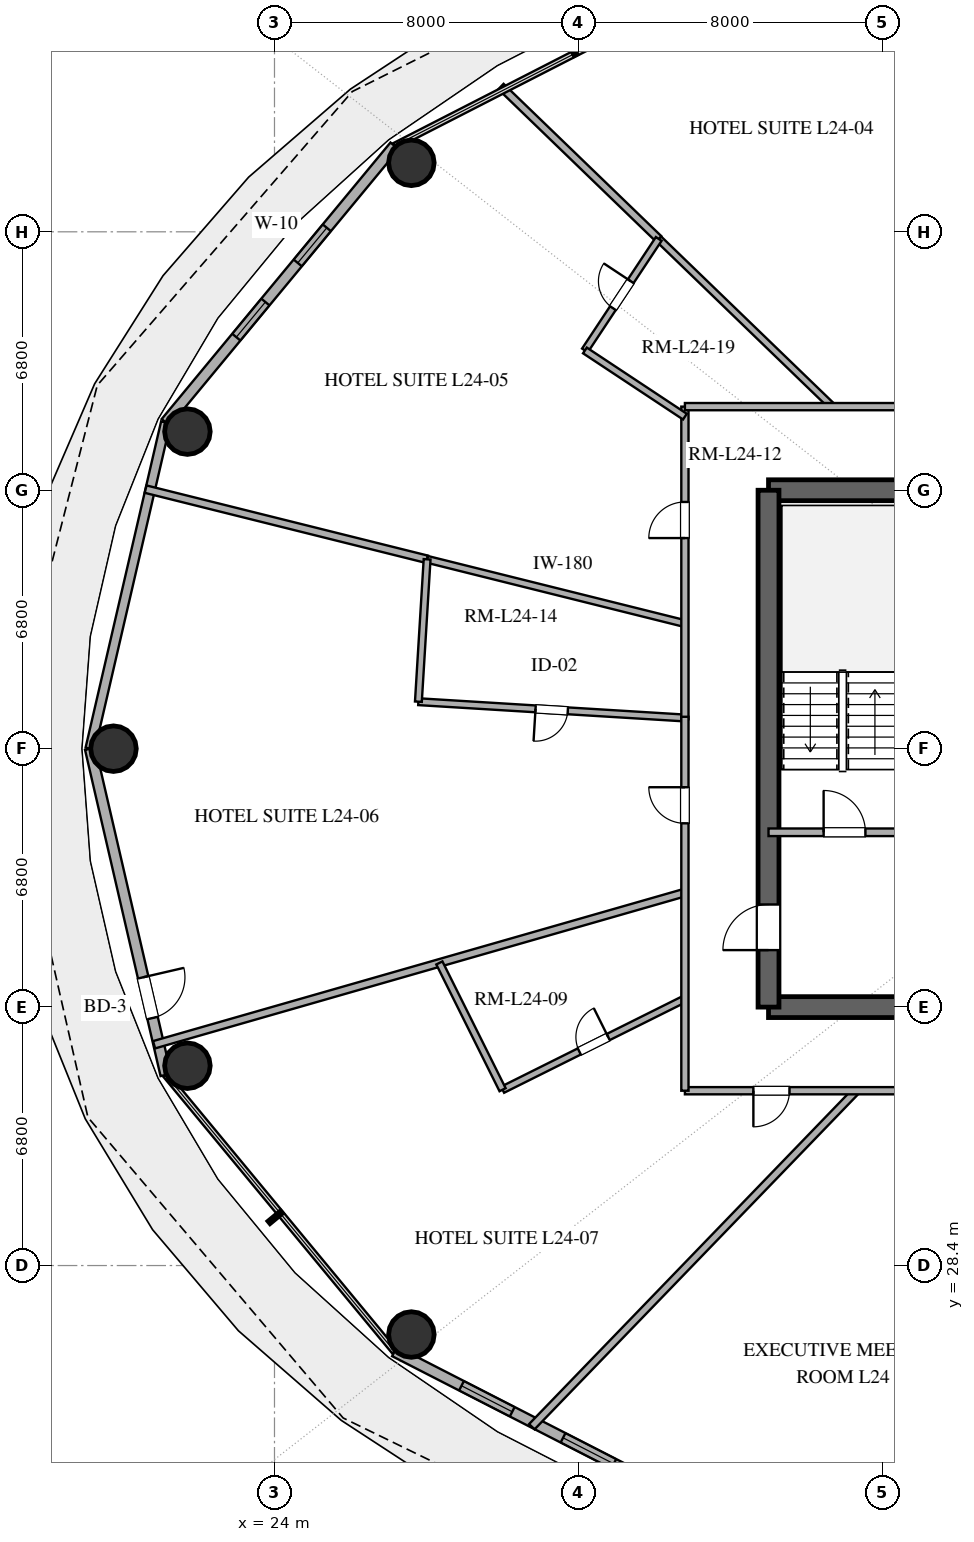
"""IFC4 building model, lengths in metres.
Left out: names, types, materials, properties, quantities, classifications, styles, units other than length and angle.
Written with IfcOpenShell. Run it as: python <this file> out.ifc"""

import sys

from ifc_helpers import new_model, si_unit, direction, frame, frame_2d, origin, origin_2d, place, context, subcontext, project, spatial, rectangle, hollow_circle, extrude, element, fill, save


model = new_model("IFC4")
c1 = context("Model", 3, precision=1e-05, world=origin(), true_north=direction((0.0, 1.0)))
c2 = subcontext(c1, "Body", "Model", "MODEL_VIEW")
j1 = project(units=[si_unit("LENGTHUNIT", "METRE"), si_unit("PLANEANGLEUNIT", "RADIAN")], contexts=[c1])
p1 = place(None, origin())
s1 = spatial("IfcSite", under=j1, at=p1, CompositionType="ELEMENT")
p2 = place(p1, origin())
s2 = spatial("IfcBuilding", under=s1, at=p2, CompositionType="ELEMENT")
p3 = place(p2, frame((0.0, 0.0, 98.4)))
s3 = spatial("IfcBuildingStorey", under=s2, at=p3, CompositionType="ELEMENT", Elevation=98.4)
for number, where, z_axis, x_axis in (
    (1, (37.0, 35.2, 0.0), (0.0, 0.0, 1.0), (1.0, 0.0, 0.0)),
    (2, (37.0, 48.8, 0.0), (0.0, 0.0, 1.0), (1.0, 0.0, 0.0)),
):
    element("IfcWall", number, at=place(p3, frame(where, z_axis=z_axis, x_axis=x_axis)), inside=s3, PredefinedType="SHEAR", context=c2, shape_type="SweptSolid", body=[
        extrude(rectangle(XDim=4.0, YDim=0.55, at=frame_2d((2.0, 0.0))), origin(), (0.0, 0.0, 1.0), 3.38),
    ])
p4 = place(p3, frame((37.0, 35.2, 0.0), z_axis=(0.0, 0.0, 1.0), x_axis=(0.0, 1.0, 0.0)))
e3 = element("IfcWall", 3, at=p4, inside=s3, PredefinedType="SHEAR", context=c2, shape_type="SweptSolid", body=[
    extrude(rectangle(XDim=13.6, YDim=0.55, at=frame_2d((6.8, 0.0))), origin(), (0.0, 0.0, 1.0), 3.38),
])
p5 = place(p4, frame((1.5, 0.0, 0.0)))
e4 = element("IfcOpeningElement", 4, at=p5, cuts=e3, PredefinedType="OPENING", context=c2, shape_type="SweptSolid", body=[
    extrude(rectangle(XDim=1.2, YDim=2.15, at=frame_2d((0.6, 1.075))), frame((0.0, 0.285, 0.0), z_axis=(0.0, -1.0, 0.0), x_axis=(1.0, 0.0, 0.0)), (0.0, 0.0, 1.0), 0.57),
])
for number, where, z_axis, x_axis in (
    (5, (27.602, 57.415, 0.0), (0.0, 0.0, 1.0), (1.0, 0.0, 0.0)),
    (6, (21.709, 50.343, 0.0), (0.0, 0.0, 1.0), (1.0, 0.0, 0.0)),
    (7, (19.763, 42.0, 0.0), (0.0, 0.0, 1.0), (1.0, 0.0, 0.0)),
    (8, (21.709, 33.657, 0.0), (0.0, 0.0, 1.0), (1.0, 0.0, 0.0)),
    (9, (27.602, 26.585, 0.0), (0.0, 0.0, 1.0), (1.0, 0.0, 0.0)),
):
    element("IfcColumn", number, at=place(p3, frame(where, z_axis=z_axis, x_axis=x_axis)), inside=s3, PredefinedType="COLUMN", context=c2, shape_type="SweptSolid", body=[
        extrude(hollow_circle(Radius=0.6, WallThickness=0.032, at=origin_2d()), origin(), (0.0, 0.0, 1.0), 3.38),
    ])
p6 = place(p3, frame((27.16, 57.86, 0.0), z_axis=(0.0, 0.0, 1.0), x_axis=(-0.637505817448, -0.770445541696, 0.0)))
e10 = element("IfcWall", 10, at=p6, inside=s3, PredefinedType="SOLIDWALL", context=c2, shape_type="SweptSolid", body=[
    extrude(rectangle(XDim=9.445, YDim=0.28, at=frame_2d((4.723, 0.0))), origin(), (0.0, 0.0, 1.0), 3.38),
])
p7 = place(p6, frame((2.797, 0.0, 0.85)))
e11 = element("IfcOpeningElement", 11, at=p7, cuts=e10, PredefinedType="OPENING", context=c2, shape_type="SweptSolid", body=[
    extrude(rectangle(XDim=1.2, YDim=1.6, at=frame_2d((0.6, 0.8))), frame((0.0, 0.15, 0.0), z_axis=(0.0, -1.0, 0.0), x_axis=(1.0, 0.0, 0.0)), (0.0, 0.0, 1.0), 0.3),
])
p8 = place(p6, frame((5.332, 0.0, 0.85)))
e12 = element("IfcOpeningElement", 12, at=p8, cuts=e10, PredefinedType="OPENING", context=c2, shape_type="SweptSolid", body=[
    extrude(rectangle(XDim=1.2, YDim=1.6, at=frame_2d((0.6, 0.8))), frame((0.0, 0.15, 0.0), z_axis=(0.0, -1.0, 0.0), x_axis=(1.0, 0.0, 0.0)), (0.0, 0.0, 1.0), 0.3),
])
p9 = place(p3, frame((21.139, 50.583, 0.0), z_axis=(0.0, 0.0, 1.0), x_axis=(-0.22558597182, -0.974223264616, 0.0)))
e13 = element("IfcWall", 13, at=p9, inside=s3, PredefinedType="SOLIDWALL", context=c2, shape_type="SweptSolid", body=[
    extrude(rectangle(XDim=8.811, YDim=0.25, at=frame_2d((4.405, 0.0))), origin(), (0.0, 0.0, 1.0), 3.38),
])
p10 = place(p3, frame((19.151, 42.0, 0.0), z_axis=(0.0, 0.0, 1.0), x_axis=(0.22558597182, -0.974223264616, 0.0)))
e14 = element("IfcWall", 14, at=p10, inside=s3, PredefinedType="SOLIDWALL", context=c2, shape_type="SweptSolid", body=[
    extrude(rectangle(XDim=8.811, YDim=0.28, at=frame_2d((4.405, 0.0))), origin(), (0.0, 0.0, 1.0), 3.38),
])
p11 = place(p10, frame((6.175, 0.0, 0.0)))
e15 = element("IfcOpeningElement", 15, at=p11, cuts=e14, PredefinedType="OPENING", context=c2, shape_type="SweptSolid", body=[
    extrude(rectangle(XDim=1.1, YDim=2.25, at=frame_2d((0.55, 1.125))), frame((0.0, 0.15, 0.0), z_axis=(0.0, -1.0, 0.0), x_axis=(1.0, 0.0, 0.0)), (0.0, 0.0, 1.0), 0.3),
])
p12 = place(p3, frame((27.16, 26.14, 0.0), z_axis=(0.0, 0.0, 1.0), x_axis=(0.889959505023, -0.45603955905, 0.0)))
e16 = element("IfcWall", 16, at=p12, inside=s3, PredefinedType="SOLIDWALL", context=c2, shape_type="SweptSolid", body=[
    extrude(rectangle(XDim=10.662, YDim=0.28, at=frame_2d((5.331, 0.0))), origin(), (0.0, 0.0, 1.0), 3.38),
])
p13 = place(p12, frame((1.979, 0.0, 0.85)))
e17 = element("IfcOpeningElement", 17, at=p13, cuts=e16, PredefinedType="OPENING", context=c2, shape_type="SweptSolid", body=[
    extrude(rectangle(XDim=1.5, YDim=2.0, at=frame_2d((0.75, 1.0))), frame((0.0, 0.15, 0.0), z_axis=(0.0, -1.0, 0.0), x_axis=(1.0, 0.0, 0.0)), (0.0, 0.0, 1.0), 0.3),
])
p14 = place(p12, frame((4.982, 0.0, 0.85)))
e18 = element("IfcOpeningElement", 18, at=p14, cuts=e16, PredefinedType="OPENING", context=c2, shape_type="SweptSolid", body=[
    extrude(rectangle(XDim=1.5, YDim=1.8, at=frame_2d((0.75, 0.9))), frame((0.0, 0.15, 0.0), z_axis=(0.0, -1.0, 0.0), x_axis=(1.0, 0.0, 0.0)), (0.0, 0.0, 1.0), 0.3),
])
p15 = place(p12, frame((7.096, 0.0, 0.85)))
e19 = element("IfcOpeningElement", 19, at=p15, cuts=e16, PredefinedType="OPENING", context=c2, shape_type="SweptSolid", body=[
    extrude(rectangle(XDim=1.5, YDim=1.8, at=frame_2d((0.75, 0.9))), frame((0.0, 0.15, 0.0), z_axis=(0.0, -1.0, 0.0), x_axis=(1.0, 0.0, 0.0)), (0.0, 0.0, 1.0), 0.3),
])
p16 = place(p3, frame((37.0, 39.8, 0.0), z_axis=(0.0, 0.0, 1.0), x_axis=(1.0, 0.0, 0.0)))
e20 = element("IfcWall", 20, at=p16, inside=s3, PredefinedType="SOLIDWALL", context=c2, shape_type="SweptSolid", body=[
    extrude(rectangle(XDim=4.0, YDim=0.2, at=frame_2d((2.0, 0.0))), origin(), (0.0, 0.0, 1.0), 2.74),
])
p17 = place(p16, frame((1.45, 0.0, 0.0)))
e21 = element("IfcOpeningElement", 21, at=p17, cuts=e20, PredefinedType="OPENING", context=c2, shape_type="SweptSolid", body=[
    extrude(rectangle(XDim=1.1, YDim=2.15, at=frame_2d((0.55, 1.075))), frame((0.0, 0.11, 0.0), z_axis=(0.0, -1.0, 0.0), x_axis=(1.0, 0.0, 0.0)), (0.0, 0.0, 1.0), 0.22),
])
p18 = place(p3, frame((30.772, 24.16, 0.0), z_axis=(0.0, 0.0, 1.0), x_axis=(0.694672506389, 0.719326149161, 0.0)))
e22 = element("IfcWall", 22, at=p18, inside=s3, PredefinedType="PARTITIONING", context=c2, shape_type="SweptSolid", body=[
    extrude(rectangle(XDim=12.289, YDim=0.2, at=frame_2d((6.145, 0.0))), origin(), (0.0, 0.0, 1.0), 2.74),
])
p19 = place(p3, frame((34.8, 38.215, 0.0), z_axis=(0.0, 0.0, 1.0), x_axis=(-0.961261030421, -0.275639676741, 0.0)))
e23 = element("IfcWall", 23, at=p19, inside=s3, PredefinedType="PARTITIONING", context=c2, shape_type="SweptSolid", body=[
    extrude(rectangle(XDim=14.531, YDim=0.2, at=frame_2d((7.266, 0.0))), origin(), (0.0, 0.0, 1.0), 2.74),
])
p20 = place(p3, frame((20.609, 48.829, 0.0), z_axis=(0.0, 0.0, 1.0), x_axis=(0.970302209845, -0.241895889938, 0.0)))
e24 = element("IfcWall", 24, at=p20, inside=s3, PredefinedType="PARTITIONING", context=c2, shape_type="SweptSolid", body=[
    extrude(rectangle(XDim=7.633, YDim=0.2, at=frame_2d((3.817, 0.0))), origin(), (0.0, 0.0, 1.0), 2.74),
])
p21 = place(p3, frame((34.8, 42.807, 0.0), z_axis=(0.0, 0.0, 1.0), x_axis=(-0.998134708281, 0.061050013314, 0.0)))
e25 = element("IfcWall", 25, at=p21, inside=s3, PredefinedType="PLUMBINGWALL", context=c2, shape_type="SweptSolid", body=[
    extrude(rectangle(XDim=7.026, YDim=0.18, at=frame_2d((3.513, 0.0))), origin(), (0.0, 0.0, 1.0), 2.74),
])
p22 = place(p21, frame((3.088, 0.0, 0.0)))
e26 = element("IfcOpeningElement", 26, at=p22, cuts=e25, PredefinedType="OPENING", context=c2, shape_type="SweptSolid", body=[
    extrude(rectangle(XDim=0.85, YDim=2.1, at=frame_2d((0.425, 1.05))), frame((0.0, 0.1, 0.0), z_axis=(0.0, -1.0, 0.0), x_axis=(1.0, 0.0, 0.0)), (0.0, 0.0, 1.0), 0.2),
])
p23 = place(p3, frame((28.016, 46.983, 0.0), z_axis=(0.0, 0.0, 1.0), x_axis=(0.970290206094, -0.241944034764, 0.0)))
e27 = element("IfcWall", 27, at=p23, inside=s3, PredefinedType="PLUMBINGWALL", context=c2, shape_type="SweptSolid", body=[
    extrude(rectangle(XDim=6.992, YDim=0.18, at=frame_2d((3.496, 0.0))), origin(), (0.0, 0.0, 1.0), 2.74),
])
p24 = place(p3, frame((47.482, 33.0, 0.0), z_axis=(0.0, 0.0, 1.0), x_axis=(-1.0, 0.0, 0.0)))
e28 = element("IfcWall", 28, at=p24, inside=s3, PredefinedType="PARTITIONING", context=c2, shape_type="SweptSolid", body=[
    extrude(rectangle(XDim=12.682, YDim=0.19, at=frame_2d((6.341, 0.0))), origin(), (0.0, 0.0, 1.0), 2.74),
])
p25 = place(p24, frame((4.455, 0.0, 0.0)))
e29 = element("IfcOpeningElement", 29, at=p25, cuts=e28, PredefinedType="OPENING", context=c2, shape_type="SweptSolid", body=[
    extrude(rectangle(XDim=1.0, YDim=2.2, at=frame_2d((0.5, 1.1))), frame((0.0, 0.105, 0.0), z_axis=(0.0, -1.0, 0.0), x_axis=(1.0, 0.0, 0.0)), (0.0, 0.0, 1.0), 0.21),
])
p26 = place(p24, frame((9.93, 0.0, 0.0)))
e30 = element("IfcOpeningElement", 30, at=p26, cuts=e28, PredefinedType="OPENING", context=c2, shape_type="SweptSolid", body=[
    extrude(rectangle(XDim=0.95, YDim=2.15, at=frame_2d((0.475, 1.075))), frame((0.0, 0.105, 0.0), z_axis=(0.0, -1.0, 0.0), x_axis=(1.0, 0.0, 0.0)), (0.0, 0.0, 1.0), 0.21),
])
p27 = place(p3, frame((34.111, 55.413, 0.0), z_axis=(0.0, 0.0, 1.0), x_axis=(0.719318009274, -0.694680935059, 0.0)))
e31 = element("IfcWall", 31, at=p27, inside=s3, PredefinedType="PLUMBINGWALL", context=c2, shape_type="SweptSolid", body=[
    extrude(rectangle(XDim=6.352, YDim=0.18, at=frame_2d((3.176, 0.0))), origin(), (0.0, 0.0, 1.0), 2.74),
])
p28 = place(p3, frame((29.959, 59.422, 0.0), z_axis=(0.0, 0.0, 1.0), x_axis=(0.719370121813, -0.694626970281, 0.0)))
e32 = element("IfcWall", 32, at=p28, inside=s3, PredefinedType="PARTITIONING", context=c2, shape_type="SweptSolid", body=[
    extrude(rectangle(XDim=5.772, YDim=0.2, at=frame_2d((2.886, 0.0))), origin(), (0.0, 0.0, 1.0), 2.74),
])
p29 = place(p3, frame((34.8, 42.775, 0.0), z_axis=(0.0, 0.0, 1.0), x_axis=(0.0, 1.0, 0.0)))
e33 = element("IfcWall", 33, at=p29, inside=s3, PredefinedType="PARTITIONING", context=c2, shape_type="SweptSolid", body=[
    extrude(rectangle(XDim=8.225, YDim=0.19, at=frame_2d((4.112, 0.0))), origin(), (0.0, 0.0, 1.0), 2.74),
])
p30 = place(p29, frame((4.767, 0.0, 0.0)))
e34 = element("IfcOpeningElement", 34, at=p30, cuts=e33, PredefinedType="OPENING", context=c2, shape_type="SweptSolid", body=[
    extrude(rectangle(XDim=0.95, YDim=2.15, at=frame_2d((0.475, 1.075))), frame((0.0, 0.105, 0.0), z_axis=(0.0, -1.0, 0.0), x_axis=(1.0, 0.0, 0.0)), (0.0, 0.0, 1.0), 0.21),
])
p31 = place(p3, frame((30.002, 33.027, 0.0), z_axis=(0.0, 0.0, 1.0), x_axis=(0.894936648514, 0.446193226244, 0.0)))
e35 = element("IfcWall", 35, at=p31, inside=s3, PredefinedType="PLUMBINGWALL", context=c2, shape_type="SweptSolid", body=[
    extrude(rectangle(XDim=5.361, YDim=0.18, at=frame_2d((2.681, 0.0))), origin(), (0.0, 0.0, 1.0), 2.74),
])
p32 = place(p31, frame((2.256, 0.0, 0.0)))
e36 = element("IfcOpeningElement", 36, at=p32, cuts=e35, PredefinedType="OPENING", context=c2, shape_type="SweptSolid", body=[
    extrude(rectangle(XDim=0.85, YDim=2.1, at=frame_2d((0.425, 1.05))), frame((0.0, 0.1, 0.0), z_axis=(0.0, -1.0, 0.0), x_axis=(1.0, 0.0, 0.0)), (0.0, 0.0, 1.0), 0.2),
])
p33 = place(p3, frame((34.8, 51.0, 0.0), z_axis=(0.0, 0.0, 1.0), x_axis=(1.0, 0.0, 0.0)))
e37 = element("IfcWall", 37, at=p33, inside=s3, PredefinedType="PARTITIONING", context=c2, shape_type="SweptSolid", body=[
    extrude(rectangle(XDim=10.653, YDim=0.19, at=frame_2d((5.326, 0.0))), origin(), (0.0, 0.0, 1.0), 2.74),
])
p34 = place(p33, frame((5.816, 0.0, 0.0)))
e38 = element("IfcOpeningElement", 38, at=p34, cuts=e37, PredefinedType="OPENING", context=c2, shape_type="SweptSolid", body=[
    extrude(rectangle(XDim=0.95, YDim=2.15, at=frame_2d((0.475, 1.075))), frame((0.0, 0.105, 0.0), z_axis=(0.0, -1.0, 0.0), x_axis=(1.0, 0.0, 0.0)), (0.0, 0.0, 1.0), 0.21),
])
p35 = place(p3, frame((34.8, 33.0, 0.0), z_axis=(0.0, 0.0, 1.0), x_axis=(0.0, 1.0, 0.0)))
e39 = element("IfcWall", 39, at=p35, inside=s3, PredefinedType="PARTITIONING", context=c2, shape_type="SweptSolid", body=[
    extrude(rectangle(XDim=9.839, YDim=0.19, at=frame_2d((4.92, 0.0))), origin(), (0.0, 0.0, 1.0), 2.74),
])
p36 = place(p35, frame((7.035, 0.0, 0.0)))
e40 = element("IfcOpeningElement", 40, at=p36, cuts=e39, PredefinedType="OPENING", context=c2, shape_type="SweptSolid", body=[
    extrude(rectangle(XDim=0.95, YDim=2.15, at=frame_2d((0.475, 1.075))), frame((0.0, 0.105, 0.0), z_axis=(0.0, -1.0, 0.0), x_axis=(1.0, 0.0, 0.0)), (0.0, 0.0, 1.0), 0.21),
])
p37 = place(p3, frame((27.787, 43.236, 0.0), z_axis=(0.0, 0.0, 1.0), x_axis=(0.061013519028, 0.998136939751, 0.0)))
e41 = element("IfcWall", 41, at=p37, inside=s3, PredefinedType="PLUMBINGWALL", context=c2, shape_type="SweptSolid", body=[
    extrude(rectangle(XDim=3.753, YDim=0.18, at=frame_2d((1.877, 0.0))), origin(), (0.0, 0.0, 1.0), 2.74),
])
p38 = place(p3, frame((28.339, 36.362, 0.0), z_axis=(0.0, 0.0, 1.0), x_axis=(0.446243949247, -0.894911357488, 0.0)))
e42 = element("IfcWall", 42, at=p38, inside=s3, PredefinedType="PLUMBINGWALL", context=c2, shape_type="SweptSolid", body=[
    extrude(rectangle(XDim=3.727, YDim=0.18, at=frame_2d((1.864, 0.0))), origin(), (0.0, 0.0, 1.0), 2.74),
])
p39 = place(p3, frame((32.169, 52.479, 0.0), z_axis=(0.0, 0.0, 1.0), x_axis=(0.551959146688, 0.833871153349, 0.0)))
e43 = element("IfcWall", 43, at=p39, inside=s3, PredefinedType="PLUMBINGWALL", context=c2, shape_type="SweptSolid", body=[
    extrude(rectangle(XDim=3.519, YDim=0.18, at=frame_2d((1.759, 0.0))), origin(), (0.0, 0.0, 1.0), 2.74),
])
p40 = place(p39, frame((1.334, 0.0, 0.0)))
e44 = element("IfcOpeningElement", 44, at=p40, cuts=e43, PredefinedType="OPENING", context=c2, shape_type="SweptSolid", body=[
    extrude(rectangle(XDim=0.85, YDim=2.1, at=frame_2d((0.425, 1.05))), frame((0.0, 0.1, 0.0), z_axis=(0.0, -1.0, 0.0), x_axis=(1.0, 0.0, 0.0)), (0.0, 0.0, 1.0), 0.2),
])
p41 = place(p3, frame((34.8, 50.737, 0.0), z_axis=(0.0, 0.0, 1.0), x_axis=(-0.833855219674, 0.5519832177, 0.0)))
e45 = element("IfcWall", 45, at=p41, inside=s3, PredefinedType="PLUMBINGWALL", context=c2, shape_type="SweptSolid", body=[
    extrude(rectangle(XDim=3.155, YDim=0.18, at=frame_2d((1.578, 0.0))), origin(), (0.0, 0.0, 1.0), 2.74),
])
p42 = place(p7, origin())
e46 = element("IfcWindow", 46, at=p42, inside=s3, PartitioningType="SINGLE_PANEL", PredefinedType="WINDOW", context=c2, shape_type="SweptSolid", body=[
    extrude(rectangle(XDim=1.2, YDim=1.6, at=frame_2d((0.6, 0.8))), frame((0.0, 0.03, 0.0), z_axis=(0.0, -1.0, 0.0), x_axis=(1.0, 0.0, 0.0)), (0.0, 0.0, 1.0), 0.06),
])
fill(e11, e46)
p43 = place(p8, origin())
e47 = element("IfcWindow", 47, at=p43, inside=s3, PartitioningType="SINGLE_PANEL", PredefinedType="WINDOW", context=c2, shape_type="SweptSolid", body=[
    extrude(rectangle(XDim=1.2, YDim=1.6, at=frame_2d((0.6, 0.8))), frame((0.0, 0.03, 0.0), z_axis=(0.0, -1.0, 0.0), x_axis=(1.0, 0.0, 0.0)), (0.0, 0.0, 1.0), 0.06),
])
fill(e12, e47)
p44 = place(p11, origin())
e48 = element("IfcDoor", 48, at=p44, inside=s3, OperationType="SINGLE_SWING_LEFT", PredefinedType="DOOR", context=c2, shape_type="SweptSolid", body=[
    extrude(rectangle(XDim=1.1, YDim=2.25, at=frame_2d((0.55, 1.125))), frame((0.0, 0.025, 0.0), z_axis=(0.0, -1.0, 0.0), x_axis=(1.0, 0.0, 0.0)), (0.0, 0.0, 1.0), 0.05),
])
fill(e15, e48)
p45 = place(p13, origin())
e49 = element("IfcWindow", 49, at=p45, inside=s3, PartitioningType="SINGLE_PANEL", PredefinedType="WINDOW", context=c2, shape_type="SweptSolid", body=[
    extrude(rectangle(XDim=1.5, YDim=2.0, at=frame_2d((0.75, 1.0))), frame((0.0, 0.03, 0.0), z_axis=(0.0, -1.0, 0.0), x_axis=(1.0, 0.0, 0.0)), (0.0, 0.0, 1.0), 0.06),
])
fill(e17, e49)
p46 = place(p14, origin())
e50 = element("IfcWindow", 50, at=p46, inside=s3, PartitioningType="SINGLE_PANEL", PredefinedType="WINDOW", context=c2, shape_type="SweptSolid", body=[
    extrude(rectangle(XDim=1.5, YDim=1.8, at=frame_2d((0.75, 0.9))), frame((0.0, 0.03, 0.0), z_axis=(0.0, -1.0, 0.0), x_axis=(1.0, 0.0, 0.0)), (0.0, 0.0, 1.0), 0.06),
])
fill(e18, e50)
p47 = place(p5, origin())
e51 = element("IfcDoor", 51, at=p47, inside=s3, OperationType="SINGLE_SWING_LEFT", PredefinedType="DOOR", context=c2, shape_type="SweptSolid", body=[
    extrude(rectangle(XDim=1.2, YDim=2.15, at=frame_2d((0.6, 1.075))), frame((0.0, 0.025, 0.0), z_axis=(0.0, -1.0, 0.0), x_axis=(1.0, 0.0, 0.0)), (0.0, 0.0, 1.0), 0.05),
])
fill(e4, e51)
p48 = place(p17, origin())
e52 = element("IfcDoor", 52, at=p48, inside=s3, OperationType="SINGLE_SWING_LEFT", PredefinedType="DOOR", context=c2, shape_type="SweptSolid", body=[
    extrude(rectangle(XDim=1.1, YDim=2.15, at=frame_2d((0.55, 1.075))), frame((0.0, 0.025, 0.0), z_axis=(0.0, -1.0, 0.0), x_axis=(1.0, 0.0, 0.0)), (0.0, 0.0, 1.0), 0.05),
])
fill(e21, e52)
p49 = place(p22, origin())
e53 = element("IfcDoor", 53, at=p49, inside=s3, OperationType="SINGLE_SWING_RIGHT", PredefinedType="DOOR", context=c2, shape_type="SweptSolid", body=[
    extrude(rectangle(XDim=0.85, YDim=2.1, at=frame_2d((0.425, 1.05))), frame((0.0, 0.025, 0.0), z_axis=(0.0, -1.0, 0.0), x_axis=(1.0, 0.0, 0.0)), (0.0, 0.0, 1.0), 0.05),
])
fill(e26, e53)
p50 = place(p26, origin())
e54 = element("IfcDoor", 54, at=p50, inside=s3, OperationType="SINGLE_SWING_RIGHT", PredefinedType="DOOR", context=c2, shape_type="SweptSolid", body=[
    extrude(rectangle(XDim=0.95, YDim=2.15, at=frame_2d((0.475, 1.075))), frame((0.0, 0.025, 0.0), z_axis=(0.0, -1.0, 0.0), x_axis=(1.0, 0.0, 0.0)), (0.0, 0.0, 1.0), 0.05),
])
fill(e30, e54)
p51 = place(p30, origin())
e55 = element("IfcDoor", 55, at=p51, inside=s3, OperationType="SINGLE_SWING_LEFT", PredefinedType="DOOR", context=c2, shape_type="SweptSolid", body=[
    extrude(rectangle(XDim=0.95, YDim=2.15, at=frame_2d((0.475, 1.075))), frame((0.0, 0.025, 0.0), z_axis=(0.0, -1.0, 0.0), x_axis=(1.0, 0.0, 0.0)), (0.0, 0.0, 1.0), 0.05),
])
fill(e34, e55)
p52 = place(p32, origin())
e56 = element("IfcDoor", 56, at=p52, inside=s3, OperationType="SINGLE_SWING_RIGHT", PredefinedType="DOOR", context=c2, shape_type="SweptSolid", body=[
    extrude(rectangle(XDim=0.85, YDim=2.1, at=frame_2d((0.425, 1.05))), frame((0.0, 0.025, 0.0), z_axis=(0.0, -1.0, 0.0), x_axis=(1.0, 0.0, 0.0)), (0.0, 0.0, 1.0), 0.05),
])
fill(e36, e56)
p53 = place(p36, origin())
e57 = element("IfcDoor", 57, at=p53, inside=s3, OperationType="SINGLE_SWING_RIGHT", PredefinedType="DOOR", context=c2, shape_type="SweptSolid", body=[
    extrude(rectangle(XDim=0.95, YDim=2.15, at=frame_2d((0.475, 1.075))), frame((0.0, 0.025, 0.0), z_axis=(0.0, -1.0, 0.0), x_axis=(1.0, 0.0, 0.0)), (0.0, 0.0, 1.0), 0.05),
])
fill(e40, e57)
p54 = place(p40, origin())
e58 = element("IfcDoor", 58, at=p54, inside=s3, OperationType="SINGLE_SWING_RIGHT", PredefinedType="DOOR", context=c2, shape_type="SweptSolid", body=[
    extrude(rectangle(XDim=0.85, YDim=2.1, at=frame_2d((0.425, 1.05))), frame((0.0, 0.025, 0.0), z_axis=(0.0, -1.0, 0.0), x_axis=(1.0, 0.0, 0.0)), (0.0, 0.0, 1.0), 0.05),
])
fill(e44, e58)
save(model, sys.argv[1])
